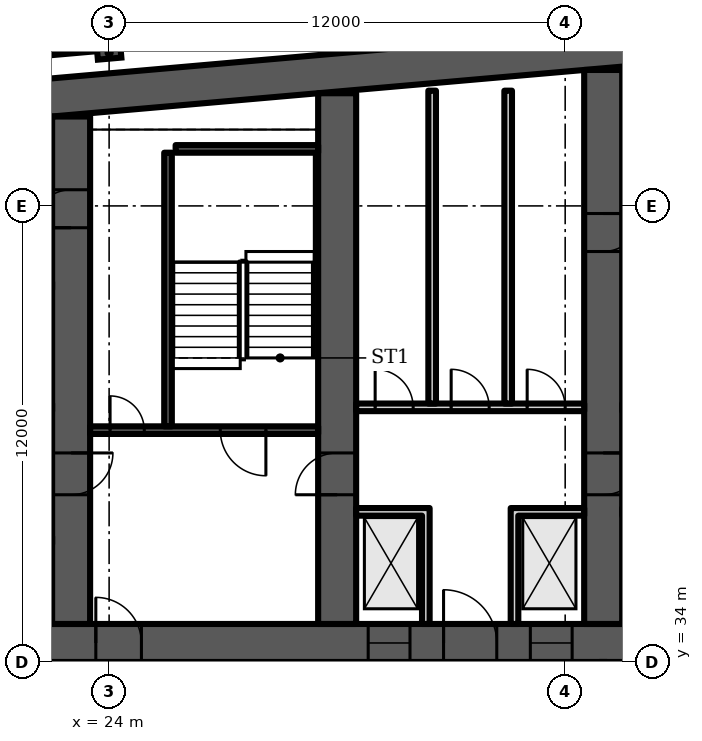
"""IFC4 building model, lengths in metres.
Left out: names, types, materials, properties, quantities, classifications, styles, units other than length and angle.
Written with IfcOpenShell. Run it as: python <this file> out.ifc"""

import sys

from ifc_helpers import new_model, si_unit, direction, frame, frame_2d, origin, origin_2d, place, context, subcontext, project, spatial, polyline, rectangle, i_section, outline, extrude, element, fill, save


model = new_model("IFC4")
c1 = context("Model", 3, precision=1e-05, world=origin(), true_north=direction((0.0, 1.0)))
c2 = subcontext(c1, "Body", "Model", "MODEL_VIEW")
j1 = project(units=[si_unit("LENGTHUNIT", "METRE"), si_unit("PLANEANGLEUNIT", "RADIAN")], contexts=[c1])
p1 = place(None, origin())
s1 = spatial("IfcSite", under=j1, at=p1, CompositionType="ELEMENT")
p2 = place(p1, origin())
s2 = spatial("IfcBuilding", under=s1, at=p2, CompositionType="ELEMENT")
p3 = place(p2, frame((0.0, 0.0, 96.7)))
s3 = spatial("IfcBuildingStorey", under=s2, at=p3, CompositionType="ELEMENT", Elevation=96.7)
p4 = place(p3, origin())
e1 = element("IfcWall", 1, at=p4, inside=s3, PredefinedType="SHEAR", context=c2, shape_type="SweptSolid", body=[
    extrude(outline(polyline([(16.0, 47.784), (40.5, 49.927), (65.0, 47.784), (65.0, 48.787), (40.5, 50.931), (16.0, 48.787), (16.0, 47.784)])), origin(), (0.0, 0.0, 1.0), 3.6),
])
p5 = place(p3, frame((16.0, 34.5, 0.0), z_axis=(0.0, 0.0, 1.0), x_axis=(1.0, 0.0, 0.0)))
e2 = element("IfcWall", 2, at=p5, inside=s3, PredefinedType="SHEAR", context=c2, shape_type="SweptSolid", body=[
    extrude(rectangle(XDim=49.0, YDim=1.0, at=frame_2d((24.5, 0.0))), origin(), (0.0, 0.0, 1.0), 3.6),
])
p6 = place(p5, frame((1.2, 0.0, 0.0)))
e3 = element("IfcOpeningElement", 3, at=p6, cuts=e2, PredefinedType="OPENING", context=c2, shape_type="SweptSolid", body=[
    extrude(rectangle(XDim=1.1, YDim=2.1, at=frame_2d((0.55, 1.05))), frame((0.0, 0.51, 0.0), z_axis=(0.0, -1.0, 0.0), x_axis=(1.0, 0.0, 0.0)), (0.0, 0.0, 1.0), 1.02),
])
p7 = place(p5, frame((5.083, 0.0, 0.0)))
e4 = element("IfcOpeningElement", 4, at=p7, cuts=e2, PredefinedType="OPENING", context=c2, shape_type="SweptSolid", body=[
    extrude(rectangle(XDim=1.1, YDim=2.1, at=frame_2d((0.55, 1.05))), frame((0.0, 0.51, 0.0), z_axis=(0.0, -1.0, 0.0), x_axis=(1.0, 0.0, 0.0)), (0.0, 0.0, 1.0), 1.02),
])
p8 = place(p5, frame((2.933, 0.0, 0.0)))
e5 = element("IfcOpeningElement", 5, at=p8, cuts=e2, PredefinedType="OPENING", context=c2, shape_type="SweptSolid", body=[
    extrude(rectangle(XDim=1.4, YDim=2.1, at=frame_2d((0.7, 1.05))), frame((0.0, 0.51, 0.0), z_axis=(0.0, -1.0, 0.0), x_axis=(1.0, 0.0, 0.0)), (0.0, 0.0, 1.0), 1.02),
])
p9 = place(p5, frame((7.65, 0.0, 0.0)))
e6 = element("IfcOpeningElement", 6, at=p9, cuts=e2, PredefinedType="OPENING", context=c2, shape_type="SweptSolid", body=[
    extrude(rectangle(XDim=1.2, YDim=2.1, at=frame_2d((0.6, 1.05))), frame((0.0, 0.51, 0.0), z_axis=(0.0, -1.0, 0.0), x_axis=(1.0, 0.0, 0.0)), (0.0, 0.0, 1.0), 1.02),
])
p10 = place(p5, frame((14.817, 0.0, 0.0)))
e7 = element("IfcOpeningElement", 7, at=p10, cuts=e2, PredefinedType="OPENING", context=c2, shape_type="SweptSolid", body=[
    extrude(rectangle(XDim=1.1, YDim=2.1, at=frame_2d((0.55, 1.05))), frame((0.0, 0.51, 0.0), z_axis=(0.0, -1.0, 0.0), x_axis=(1.0, 0.0, 0.0)), (0.0, 0.0, 1.0), 1.02),
])
p11 = place(p5, frame((19.083, 0.0, 0.0)))
e8 = element("IfcOpeningElement", 8, at=p11, cuts=e2, PredefinedType="OPENING", context=c2, shape_type="SweptSolid", body=[
    extrude(rectangle(XDim=1.1, YDim=2.1, at=frame_2d((0.55, 1.05))), frame((0.0, 0.51, 0.0), z_axis=(0.0, -1.0, 0.0), x_axis=(1.0, 0.0, 0.0)), (0.0, 0.0, 1.0), 1.02),
])
p12 = place(p5, frame((16.8, 0.0, 0.0)))
e9 = element("IfcOpeningElement", 9, at=p12, cuts=e2, PredefinedType="OPENING", context=c2, shape_type="SweptSolid", body=[
    extrude(rectangle(XDim=1.4, YDim=2.1, at=frame_2d((0.7, 1.05))), frame((0.0, 0.51, 0.0), z_axis=(0.0, -1.0, 0.0), x_axis=(1.0, 0.0, 0.0)), (0.0, 0.0, 1.0), 1.02),
])
p13 = place(p5, frame((21.817, 0.0, 0.0)))
e10 = element("IfcOpeningElement", 10, at=p13, cuts=e2, PredefinedType="OPENING", context=c2, shape_type="SweptSolid", body=[
    extrude(rectangle(XDim=1.1, YDim=2.1, at=frame_2d((0.55, 1.05))), frame((0.0, 0.51, 0.0), z_axis=(0.0, -1.0, 0.0), x_axis=(1.0, 0.0, 0.0)), (0.0, 0.0, 1.0), 1.02),
])
p14 = place(p5, frame((26.083, 0.0, 0.0)))
e11 = element("IfcOpeningElement", 11, at=p14, cuts=e2, PredefinedType="OPENING", context=c2, shape_type="SweptSolid", body=[
    extrude(rectangle(XDim=1.1, YDim=2.1, at=frame_2d((0.55, 1.05))), frame((0.0, 0.51, 0.0), z_axis=(0.0, -1.0, 0.0), x_axis=(1.0, 0.0, 0.0)), (0.0, 0.0, 1.0), 1.02),
])
p15 = place(p5, frame((33.15, 0.0, 0.0)))
e12 = element("IfcOpeningElement", 12, at=p15, cuts=e2, PredefinedType="OPENING", context=c2, shape_type="SweptSolid", body=[
    extrude(rectangle(XDim=1.2, YDim=2.1, at=frame_2d((0.6, 1.05))), frame((0.0, 0.51, 0.0), z_axis=(0.0, -1.0, 0.0), x_axis=(1.0, 0.0, 0.0)), (0.0, 0.0, 1.0), 1.02),
])
p16 = place(p5, frame((37.8, 0.0, 0.0)))
e13 = element("IfcOpeningElement", 13, at=p16, cuts=e2, PredefinedType="OPENING", context=c2, shape_type="SweptSolid", body=[
    extrude(rectangle(XDim=1.4, YDim=2.1, at=frame_2d((0.7, 1.05))), frame((0.0, 0.51, 0.0), z_axis=(0.0, -1.0, 0.0), x_axis=(1.0, 0.0, 0.0)), (0.0, 0.0, 1.0), 1.02),
])
p17 = place(p5, frame((42.817, 0.0, 0.0)))
e14 = element("IfcOpeningElement", 14, at=p17, cuts=e2, PredefinedType="OPENING", context=c2, shape_type="SweptSolid", body=[
    extrude(rectangle(XDim=1.1, YDim=2.1, at=frame_2d((0.55, 1.05))), frame((0.0, 0.51, 0.0), z_axis=(0.0, -1.0, 0.0), x_axis=(1.0, 0.0, 0.0)), (0.0, 0.0, 1.0), 1.02),
])
p18 = place(p5, frame((46.7, 0.0, 0.0)))
e15 = element("IfcOpeningElement", 15, at=p18, cuts=e2, PredefinedType="OPENING", context=c2, shape_type="SweptSolid", body=[
    extrude(rectangle(XDim=1.1, YDim=2.1, at=frame_2d((0.55, 1.05))), frame((0.0, 0.51, 0.0), z_axis=(0.0, -1.0, 0.0), x_axis=(1.0, 0.0, 0.0)), (0.0, 0.0, 1.0), 1.02),
])
p19 = place(p5, frame((44.667, 0.0, 0.0)))
e16 = element("IfcOpeningElement", 16, at=p19, cuts=e2, PredefinedType="OPENING", context=c2, shape_type="SweptSolid", body=[
    extrude(rectangle(XDim=1.4, YDim=2.1, at=frame_2d((0.7, 1.05))), frame((0.0, 0.51, 0.0), z_axis=(0.0, -1.0, 0.0), x_axis=(1.0, 0.0, 0.0)), (0.0, 0.0, 1.0), 1.02),
])
p20 = place(p3, frame((23.0, 35.0, 0.0), z_axis=(0.0, 0.0, 1.0), x_axis=(0.0, 1.0, 0.0)))
e17 = element("IfcWall", 17, at=p20, inside=s3, PredefinedType="SHEAR", context=c2, shape_type="SweptSolid", body=[
    extrude(rectangle(XDim=13.352, YDim=1.0, at=frame_2d((6.676, 0.0))), origin(), (0.0, 0.0, 1.0), 3.6),
])
p21 = place(p20, frame((10.426, 0.0, 0.0)))
e18 = element("IfcOpeningElement", 18, at=p21, cuts=e17, PredefinedType="OPENING", context=c2, shape_type="SweptSolid", body=[
    extrude(rectangle(XDim=1.0, YDim=2.1, at=frame_2d((0.5, 1.05))), frame((0.0, 0.51, 0.0), z_axis=(0.0, -1.0, 0.0), x_axis=(1.0, 0.0, 0.0)), (0.0, 0.0, 1.0), 1.02),
])
p22 = place(p20, frame((3.4, 0.0, 0.0)))
e19 = element("IfcOpeningElement", 19, at=p22, cuts=e17, PredefinedType="OPENING", context=c2, shape_type="SweptSolid", body=[
    extrude(rectangle(XDim=1.1, YDim=2.1, at=frame_2d((0.55, 1.05))), frame((0.0, 0.51, 0.0), z_axis=(0.0, -1.0, 0.0), x_axis=(1.0, 0.0, 0.0)), (0.0, 0.0, 1.0), 1.02),
])
p23 = place(p3, frame((30.0, 35.0, 0.0), z_axis=(0.0, 0.0, 1.0), x_axis=(0.0, 1.0, 0.0)))
e20 = element("IfcWall", 20, at=p23, inside=s3, PredefinedType="SHEAR", context=c2, shape_type="SweptSolid", body=[
    extrude(rectangle(XDim=13.965, YDim=1.0, at=frame_2d((6.982, 0.0))), origin(), (0.0, 0.0, 1.0), 3.6),
])
p24 = place(p23, frame((3.4, 0.0, 0.0)))
e21 = element("IfcOpeningElement", 21, at=p24, cuts=e20, PredefinedType="OPENING", context=c2, shape_type="SweptSolid", body=[
    extrude(rectangle(XDim=1.1, YDim=2.1, at=frame_2d((0.55, 1.05))), frame((0.0, 0.51, 0.0), z_axis=(0.0, -1.0, 0.0), x_axis=(1.0, 0.0, 0.0)), (0.0, 0.0, 1.0), 1.02),
])
p25 = place(p3, frame((37.0, 35.0, 0.0), z_axis=(0.0, 0.0, 1.0), x_axis=(0.0, 1.0, 0.0)))
e22 = element("IfcWall", 22, at=p25, inside=s3, PredefinedType="SHEAR", context=c2, shape_type="SweptSolid", body=[
    extrude(rectangle(XDim=14.577, YDim=1.0, at=frame_2d((7.289, 0.0))), origin(), (0.0, 0.0, 1.0), 3.6),
])
p26 = place(p25, frame((3.4, 0.0, 0.0)))
e23 = element("IfcOpeningElement", 23, at=p26, cuts=e22, PredefinedType="OPENING", context=c2, shape_type="SweptSolid", body=[
    extrude(rectangle(XDim=1.1, YDim=2.1, at=frame_2d((0.55, 1.05))), frame((0.0, 0.51, 0.0), z_axis=(0.0, -1.0, 0.0), x_axis=(1.0, 0.0, 0.0)), (0.0, 0.0, 1.0), 1.02),
])
p27 = place(p25, frame((9.8, 0.0, 0.0)))
e24 = element("IfcOpeningElement", 24, at=p27, cuts=e22, PredefinedType="OPENING", context=c2, shape_type="SweptSolid", body=[
    extrude(rectangle(XDim=1.0, YDim=2.1, at=frame_2d((0.5, 1.05))), frame((0.0, 0.51, 0.0), z_axis=(0.0, -1.0, 0.0), x_axis=(1.0, 0.0, 0.0)), (0.0, 0.0, 1.0), 1.02),
])
p28 = place(p3, frame((24.0, 50.027, 0.0), z_axis=(0.0, 0.0, 1.0), x_axis=(-0.087156, 0.996198, 0.0)))
e25 = element("IfcColumn", 25, at=p28, inside=s3, PredefinedType="COLUMN", context=c2, shape_type="SweptSolid", body=[
    extrude(i_section(OverallWidth=0.305, OverallDepth=0.62, WebThickness=0.021, FlangeThickness=0.04, FilletRadius=0.027, at=origin_2d()), origin(), (0.0, 0.0, 1.0), 3.6),
])
p29 = place(p3, frame((13.0, 49.263, 0.0), z_axis=(0.0, 0.0, 1.0), x_axis=(0.996193, 0.087159, 0.0)))
e26 = element("IfcWall", 26, at=p29, inside=s3, PredefinedType="PARAPET", context=c2, shape_type="SweptSolid", body=[
    extrude(rectangle(XDim=24.092, YDim=0.25, at=frame_2d((12.046, 0.0))), origin(), (0.0, 0.0, 1.0), 1.1),
])
p30 = place(p3, frame((23.5, 40.1, 0.0), z_axis=(0.0, 0.0, 1.0), x_axis=(1.0, 0.0, 0.0)))
e27 = element("IfcWall", 27, at=p30, inside=s3, PredefinedType="SHEAR", context=c2, shape_type="SweptSolid", body=[
    extrude(rectangle(XDim=6.0, YDim=0.2, at=frame_2d((3.0, 0.0))), origin(), (0.0, 0.0, 1.0), 3.2),
])
p31 = place(p30, frame((3.425, 0.0, 0.0)))
e28 = element("IfcOpeningElement", 28, at=p31, cuts=e27, PredefinedType="OPENING", context=c2, shape_type="SweptSolid", body=[
    extrude(rectangle(XDim=1.2, YDim=2.1, at=frame_2d((0.6, 1.05))), frame((0.0, 0.11, 0.0), z_axis=(0.0, -1.0, 0.0), x_axis=(1.0, 0.0, 0.0)), (0.0, 0.0, 1.0), 0.22),
])
p32 = place(p30, frame((0.525, 0.0, 0.0)))
e29 = element("IfcOpeningElement", 29, at=p32, cuts=e27, PredefinedType="OPENING", context=c2, shape_type="SweptSolid", body=[
    extrude(rectangle(XDim=0.9, YDim=2.1, at=frame_2d((0.45, 1.05))), frame((0.0, 0.11, 0.0), z_axis=(0.0, -1.0, 0.0), x_axis=(1.0, 0.0, 0.0)), (0.0, 0.0, 1.0), 0.22),
])
p33 = place(p3, frame((25.55, 40.2, 0.0), z_axis=(0.0, 0.0, 1.0), x_axis=(0.0, 1.0, 0.0)))
e30 = element("IfcWall", 30, at=p33, inside=s3, PredefinedType="SHEAR", context=c2, shape_type="SweptSolid", body=[
    extrude(rectangle(XDim=7.2, YDim=0.2, at=frame_2d((3.6, 0.0))), origin(), (0.0, 0.0, 1.0), 3.2),
])
p34 = place(p3, frame((25.75, 47.5, 0.0), z_axis=(0.0, 0.0, 1.0), x_axis=(1.0, 0.0, 0.0)))
e31 = element("IfcWall", 31, at=p34, inside=s3, PredefinedType="SHEAR", context=c2, shape_type="SweptSolid", body=[
    extrude(rectangle(XDim=3.75, YDim=0.2, at=frame_2d((1.875, 0.0))), origin(), (0.0, 0.0, 1.0), 3.2),
])
p35 = place(p3, frame((30.5, 40.7, 0.0), z_axis=(0.0, 0.0, 1.0), x_axis=(1.0, 0.0, 0.0)))
e32 = element("IfcWall", 32, at=p35, inside=s3, PredefinedType="PARTITIONING", context=c2, shape_type="SweptSolid", body=[
    extrude(rectangle(XDim=6.0, YDim=0.2, at=frame_2d((3.0, 0.0))), origin(), (0.0, 0.0, 1.0), 3.2),
])
p36 = place(p35, frame((0.5, 0.0, 0.0)))
e33 = element("IfcOpeningElement", 33, at=p36, cuts=e32, PredefinedType="OPENING", context=c2, shape_type="SweptSolid", body=[
    extrude(rectangle(XDim=1.0, YDim=2.1, at=frame_2d((0.5, 1.05))), frame((0.0, 0.11, 0.0), z_axis=(0.0, -1.0, 0.0), x_axis=(1.0, 0.0, 0.0)), (0.0, 0.0, 1.0), 0.22),
])
p37 = place(p35, frame((2.5, 0.0, 0.0)))
e34 = element("IfcOpeningElement", 34, at=p37, cuts=e32, PredefinedType="OPENING", context=c2, shape_type="SweptSolid", body=[
    extrude(rectangle(XDim=1.0, YDim=2.1, at=frame_2d((0.5, 1.05))), frame((0.0, 0.11, 0.0), z_axis=(0.0, -1.0, 0.0), x_axis=(1.0, 0.0, 0.0)), (0.0, 0.0, 1.0), 0.22),
])
p38 = place(p35, frame((4.5, 0.0, 0.0)))
e35 = element("IfcOpeningElement", 35, at=p38, cuts=e32, PredefinedType="OPENING", context=c2, shape_type="SweptSolid", body=[
    extrude(rectangle(XDim=1.0, YDim=2.1, at=frame_2d((0.5, 1.05))), frame((0.0, 0.11, 0.0), z_axis=(0.0, -1.0, 0.0), x_axis=(1.0, 0.0, 0.0)), (0.0, 0.0, 1.0), 0.22),
])
p39 = place(p3, frame((0.0, 0.0, -0.0)))
e36 = element("IfcWall", 36, at=p39, inside=s3, PredefinedType="PARTITIONING", context=c2, shape_type="SweptSolid", body=[
    extrude(outline(polyline([(32.233, 37.85), (30.5, 37.85), (30.5, 38.05), (32.233, 38.05), (32.433, 38.05), (32.433, 35.0), (32.233, 35.0), (32.233, 37.85)])), origin(), (0.0, 0.0, 1.0), 3.2),
])
p40 = place(p3, frame((0.0, 0.0, -0.0)))
e37 = element("IfcWall", 37, at=p40, inside=s3, PredefinedType="PARTITIONING", context=c2, shape_type="SweptSolid", body=[
    extrude(outline(polyline([(34.567, 38.05), (34.767, 38.05), (36.5, 38.05), (36.5, 37.85), (34.767, 37.85), (34.767, 35.0), (34.567, 35.0), (34.567, 38.05)])), origin(), (0.0, 0.0, 1.0), 3.2),
])
for number, where, z_axis, x_axis in (
    (38, (32.5, 40.8, 0.0), (0.0, 0.0, 1.0), (0.0, 1.0, 0.0)),
    (39, (34.5, 40.8, 0.0), (0.0, 0.0, 1.0), (0.0, 1.0, 0.0)),
):
    element("IfcWall", number, at=place(p3, frame(where, z_axis=z_axis, x_axis=x_axis)), inside=s3, PredefinedType="PARTITIONING", context=c2, shape_type="SweptSolid", body=[
        extrude(rectangle(XDim=8.232, YDim=0.2, at=frame_2d((4.116, 0.0))), origin(), (0.0, 0.0, 1.0), 3.2),
    ])
p41 = place(p21, origin())
e40 = element("IfcDoor", 40, at=p41, inside=s3, OperationType="SINGLE_SWING_LEFT", PredefinedType="DOOR", context=c2, shape_type="SweptSolid", body=[
    extrude(rectangle(XDim=1.0, YDim=2.1, at=frame_2d((0.5, 1.05))), frame((0.0, 0.5, 0.0), z_axis=(0.0, -1.0, 0.0), x_axis=(1.0, 0.0, 0.0)), (0.0, 0.0, 1.0), 1.0),
])
fill(e18, e40)
p42 = place(p31, origin())
e41 = element("IfcDoor", 41, at=p42, inside=s3, OperationType="SINGLE_SWING_RIGHT", PredefinedType="DOOR", context=c2, shape_type="SweptSolid", body=[
    extrude(rectangle(XDim=1.2, YDim=2.1, at=frame_2d((0.6, 1.05))), frame((0.0, 0.025, 0.0), z_axis=(0.0, -1.0, 0.0), x_axis=(1.0, 0.0, 0.0)), (0.0, 0.0, 1.0), 0.05),
])
fill(e28, e41)
p43 = place(p32, origin())
e42 = element("IfcDoor", 42, at=p43, inside=s3, OperationType="SINGLE_SWING_LEFT", PredefinedType="DOOR", context=c2, shape_type="SweptSolid", body=[
    extrude(rectangle(XDim=0.9, YDim=2.1, at=frame_2d((0.45, 1.05))), frame((0.0, 0.025, 0.0), z_axis=(0.0, -1.0, 0.0), x_axis=(1.0, 0.0, 0.0)), (0.0, 0.0, 1.0), 0.05),
])
fill(e29, e42)
p44 = place(p9, origin())
e43 = element("IfcDoor", 43, at=p44, inside=s3, OperationType="SINGLE_SWING_LEFT", PredefinedType="DOOR", context=c2, shape_type="SweptSolid", body=[
    extrude(rectangle(XDim=1.2, YDim=2.1, at=frame_2d((0.6, 1.05))), frame((0.0, 0.025, 0.0), z_axis=(0.0, -1.0, 0.0), x_axis=(1.0, 0.0, 0.0)), (0.0, 0.0, 1.0), 0.05),
])
fill(e6, e43)
p45 = place(p10, origin())
e44 = element("IfcDoor", 44, at=p45, inside=s3, OperationType="DOUBLE_DOOR_SLIDING", PredefinedType="DOOR", context=c2, shape_type="SweptSolid", body=[
    extrude(rectangle(XDim=1.1, YDim=2.1, at=frame_2d((0.55, 1.05))), frame((0.0, 0.025, 0.0), z_axis=(0.0, -1.0, 0.0), x_axis=(1.0, 0.0, 0.0)), (0.0, 0.0, 1.0), 0.05),
])
fill(e7, e44)
p46 = place(p11, origin())
e45 = element("IfcDoor", 45, at=p46, inside=s3, OperationType="DOUBLE_DOOR_SLIDING", PredefinedType="DOOR", context=c2, shape_type="SweptSolid", body=[
    extrude(rectangle(XDim=1.1, YDim=2.1, at=frame_2d((0.55, 1.05))), frame((0.0, 0.025, 0.0), z_axis=(0.0, -1.0, 0.0), x_axis=(1.0, 0.0, 0.0)), (0.0, 0.0, 1.0), 0.05),
])
fill(e8, e45)
p47 = place(p12, origin())
e46 = element("IfcDoor", 46, at=p47, inside=s3, OperationType="DOUBLE_DOOR_SINGLE_SWING", PredefinedType="DOOR", context=c2, shape_type="SweptSolid", body=[
    extrude(rectangle(XDim=1.4, YDim=2.1, at=frame_2d((0.7, 1.05))), frame((0.0, 0.025, 0.0), z_axis=(0.0, -1.0, 0.0), x_axis=(1.0, 0.0, 0.0)), (0.0, 0.0, 1.0), 0.05),
])
fill(e9, e46)
p48 = place(p36, origin())
e47 = element("IfcDoor", 47, at=p48, inside=s3, OperationType="SINGLE_SWING_LEFT", PredefinedType="DOOR", context=c2, shape_type="SweptSolid", body=[
    extrude(rectangle(XDim=1.0, YDim=2.1, at=frame_2d((0.5, 1.05))), frame((0.0, 0.025, 0.0), z_axis=(0.0, -1.0, 0.0), x_axis=(1.0, 0.0, 0.0)), (0.0, 0.0, 1.0), 0.05),
])
fill(e33, e47)
p49 = place(p37, origin())
e48 = element("IfcDoor", 48, at=p49, inside=s3, OperationType="SINGLE_SWING_LEFT", PredefinedType="DOOR", context=c2, shape_type="SweptSolid", body=[
    extrude(rectangle(XDim=1.0, YDim=2.1, at=frame_2d((0.5, 1.05))), frame((0.0, 0.025, 0.0), z_axis=(0.0, -1.0, 0.0), x_axis=(1.0, 0.0, 0.0)), (0.0, 0.0, 1.0), 0.05),
])
fill(e34, e48)
p50 = place(p38, origin())
e49 = element("IfcDoor", 49, at=p50, inside=s3, OperationType="SINGLE_SWING_LEFT", PredefinedType="DOOR", context=c2, shape_type="SweptSolid", body=[
    extrude(rectangle(XDim=1.0, YDim=2.1, at=frame_2d((0.5, 1.05))), frame((0.0, 0.025, 0.0), z_axis=(0.0, -1.0, 0.0), x_axis=(1.0, 0.0, 0.0)), (0.0, 0.0, 1.0), 0.05),
])
fill(e35, e49)
p51 = place(p22, origin())
e50 = element("IfcDoor", 50, at=p51, inside=s3, OperationType="SINGLE_SWING_RIGHT", PredefinedType="DOOR", context=c2, shape_type="SweptSolid", body=[
    extrude(rectangle(XDim=1.1, YDim=2.1, at=frame_2d((0.55, 1.05))), frame((0.0, 0.025, 0.0), z_axis=(0.0, -1.0, 0.0), x_axis=(1.0, 0.0, 0.0)), (0.0, 0.0, 1.0), 0.05),
])
fill(e19, e50)
p52 = place(p24, origin())
e51 = element("IfcDoor", 51, at=p52, inside=s3, OperationType="SINGLE_SWING_LEFT", PredefinedType="DOOR", context=c2, shape_type="SweptSolid", body=[
    extrude(rectangle(XDim=1.1, YDim=2.1, at=frame_2d((0.55, 1.05))), frame((0.0, 0.025, 0.0), z_axis=(0.0, -1.0, 0.0), x_axis=(1.0, 0.0, 0.0)), (0.0, 0.0, 1.0), 0.05),
])
fill(e21, e51)
p53 = place(p26, origin())
e52 = element("IfcDoor", 52, at=p53, inside=s3, OperationType="SINGLE_SWING_RIGHT", PredefinedType="DOOR", context=c2, shape_type="SweptSolid", body=[
    extrude(rectangle(XDim=1.1, YDim=2.1, at=frame_2d((0.55, 1.05))), frame((0.0, 0.025, 0.0), z_axis=(0.0, -1.0, 0.0), x_axis=(1.0, 0.0, 0.0)), (0.0, 0.0, 1.0), 0.05),
])
fill(e23, e52)
p54 = place(p27, origin())
e53 = element("IfcDoor", 53, at=p54, inside=s3, OperationType="SINGLE_SWING_RIGHT", PredefinedType="DOOR", context=c2, shape_type="SweptSolid", body=[
    extrude(rectangle(XDim=1.0, YDim=2.1, at=frame_2d((0.5, 1.05))), frame((0.0, 0.5, 0.0), z_axis=(0.0, -1.0, 0.0), x_axis=(1.0, 0.0, 0.0)), (0.0, 0.0, 1.0), 1.0),
])
fill(e24, e53)
save(model, sys.argv[1])
